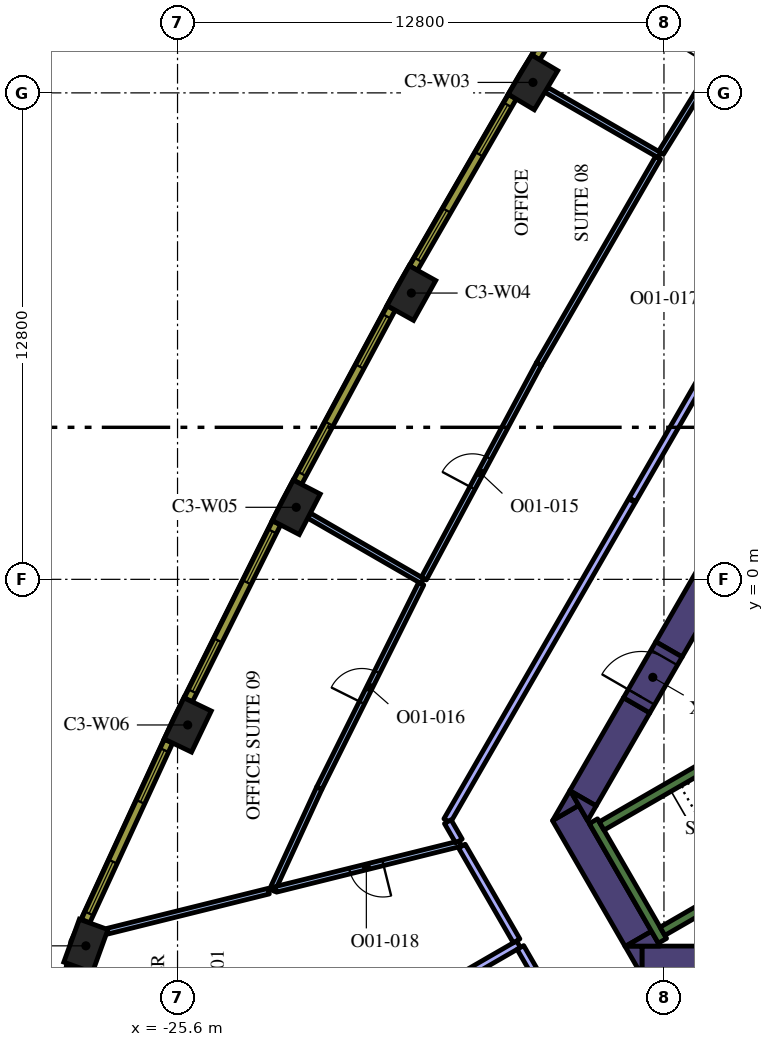
"""IFC4 building model, lengths in metres.
Left out: names, types, materials, properties, quantities, classifications, styles, units other than length and angle.
Written with IfcOpenShell. Run it as: python <this file> out.ifc"""

import sys

from ifc_helpers import new_model, si_unit, direction, frame, frame_2d, origin, origin_2d, place, context, subcontext, project, spatial, polyline, rectangle, outline, extrude, element, fill, save


model = new_model("IFC4")
c1 = context("Model", 3, precision=1e-05, world=origin(), true_north=direction((0.0, 1.0)))
c2 = subcontext(c1, "Body", "Model", "MODEL_VIEW")
j1 = project(units=[si_unit("LENGTHUNIT", "METRE"), si_unit("PLANEANGLEUNIT", "RADIAN")], contexts=[c1])
p1 = place(None, origin())
s1 = spatial("IfcSite", under=j1, at=p1, CompositionType="ELEMENT")
p2 = place(p1, origin())
s2 = spatial("IfcBuilding", under=s1, at=p2, CompositionType="ELEMENT")
p3 = place(p2, frame((0.0, 0.0, 145.8)))
s3 = spatial("IfcBuildingStorey", under=s2, at=p3, CompositionType="ELEMENT", Elevation=145.8)
for number, where, z_axis, x_axis in (
    (1, (-16.247, 13.075, 0.0), (0.0, 0.0, 1.0), (-0.513, -0.858, 0.0)),
    (2, (-19.447, 7.533, 0.0), (0.0, 0.0, 1.0), (-0.487, -0.874, 0.0)),
    (3, (-22.476, 1.896, 0.0), (0.0, 0.0, 1.0), (-0.46, -0.888, 0.0)),
    (4, (-25.332, -3.832, 0.0), (0.0, 0.0, 1.0), (-0.433, -0.902, 0.0)),
    (5, (-28.012, -9.644, 0.0), (0.0, 0.0, 1.0), (-0.341, -0.94, 0.0)),
):
    element("IfcColumn", number, at=place(p3, frame(where, z_axis=z_axis, x_axis=x_axis)), inside=s3, PredefinedType="COLUMN", context=c2, shape_type="SweptSolid", body=[
        extrude(rectangle(XDim=1.2, YDim=0.8, at=origin_2d()), origin(), (0.0, 0.0, 1.0), 4.2),
    ])
p4 = place(p3, frame((-13.378, -10.05, 0.0), z_axis=(0.0, 0.0, 1.0), x_axis=(1.0, 0.0, 0.0)))
e6 = element("IfcWall", 6, at=p4, inside=s3, PredefinedType="SOLIDWALL", context=c2, shape_type="SweptSolid", body=[
    extrude(rectangle(XDim=22.282, YDim=0.8, at=frame_2d((11.141, 0.0))), origin(), (0.0, 0.0, 1.0), 4.2),
])
p5 = place(p3, origin())
e7 = element("IfcWall", 7, at=p5, inside=s3, PredefinedType="SOLIDWALL", context=c2, shape_type="SweptSolid", body=[
    extrude(outline(polyline([(-13.828, -9.65), (-13.38, -9.65), (-13.38, -10.426), (-13.828, -9.65)])), origin(), (0.0, 0.0, 1.0), 4.2),
])
p6 = place(p3, frame((-15.387, -6.148, 0.0), z_axis=(0.0, 0.0, 1.0), x_axis=(0.499984020225, -0.866034629516, 0.0)))
e8 = element("IfcWall", 8, at=p6, inside=s3, PredefinedType="SOLIDWALL", context=c2, shape_type="SweptSolid", body=[
    extrude(rectangle(XDim=3.824, YDim=0.8, at=frame_2d((1.912, 0.0))), origin(), (0.0, 0.0, 1.0), 4.2),
])
e9 = element("IfcWall", 9, at=p5, inside=s3, PredefinedType="SOLIDWALL", context=c2, shape_type="SweptSolid", body=[
    extrude(outline(polyline([(-15.042, -5.947), (-15.729, -6.343), (-15.271, -5.55), (-15.042, -5.947)])), origin(), (0.0, 0.0, 1.0), 4.2),
])
e10 = element("IfcWall", 10, at=p5, inside=s3, PredefinedType="SOLIDWALL", context=c2, shape_type="SweptSolid", body=[
    extrude(outline(polyline([(-12.904, -9.65), (-13.8, -9.65), (-13.128, -9.262), (-12.904, -9.65)])), origin(), (0.0, 0.0, 1.0), 4.2),
])
p7 = place(p3, frame((-13.518, -3.314, 0.0), z_axis=(0.0, 0.0, 1.0), x_axis=(-0.499969377405, -0.866043083026, 0.0)))
e11 = element("IfcWall", 11, at=p7, inside=s3, PredefinedType="SOLIDWALL", context=c2, shape_type="SweptSolid", body=[
    extrude(rectangle(XDim=2.824, YDim=0.8, at=frame_2d((1.412, 0.0))), origin(), (0.0, 0.0, 1.0), 4.2),
])
e12 = element("IfcWall", 12, at=p5, inside=s3, PredefinedType="SOLIDWALL", context=c2, shape_type="SweptSolid", body=[
    extrude(outline(polyline([(-14.809, -6.35), (-15.257, -5.574), (-14.585, -5.962), (-14.809, -6.35)])), origin(), (0.0, 0.0, 1.0), 4.2),
])
p8 = place(p3, frame((-12.668, -1.842, 0.0), z_axis=(0.0, 0.0, 1.0), x_axis=(0.500003640647, 0.866023301845, 0.0)))
e13 = element("IfcWall", 13, at=p8, inside=s3, PredefinedType="SOLIDWALL", context=c2, shape_type="SweptSolid", body=[
    extrude(rectangle(XDim=15.858, YDim=0.8, at=frame_2d((7.929, 0.0))), origin(), (0.0, 0.0, 1.0), 4.2),
])
p9 = place(p3, frame((-12.84, -9.511, 0.0), z_axis=(0.0, 0.0, 1.0), x_axis=(-0.499997733992, 0.866026712061, 0.0)))
e14 = element("IfcWall", 14, at=p9, inside=s3, PredefinedType="SOLIDWALL", context=c2, shape_type="SweptSolid", body=[
    extrude(rectangle(XDim=3.634, YDim=0.25, at=frame_2d((1.817, 0.0))), origin(), (0.0, 0.0, 1.0), 4.2),
])
p10 = place(p3, frame((-14.44, -6.49, 0.0), z_axis=(0.0, 0.0, 1.0), x_axis=(0.866022966069, 0.500004222222, 0.0)))
e15 = element("IfcWall", 15, at=p10, inside=s3, PredefinedType="SOLIDWALL", context=c2, shape_type="SweptSolid", body=[
    extrude(rectangle(XDim=6.8, YDim=0.25, at=frame_2d((3.4, 0.0))), origin(), (0.0, 0.0, 1.0), 4.2),
])
p11 = place(p3, frame((-12.84, -9.261, 0.0), z_axis=(0.0, 0.0, 1.0), x_axis=(0.866016039709, 0.500016218704, 0.0)))
e16 = element("IfcWall", 16, at=p11, inside=s3, PredefinedType="SOLIDWALL", context=c2, shape_type="SweptSolid", body=[
    extrude(rectangle(XDim=7.05, YDim=0.25, at=frame_2d((3.525, 0.0))), origin(), (0.0, 0.0, 1.0), 4.2),
])
p12 = place(p3, frame((-13.518, -3.314, 0.0), z_axis=(0.0, 0.0, 1.0), x_axis=(0.500062241894, 0.865989465428, 0.0)))
e17 = element("IfcWall", 17, at=p12, inside=s3, PredefinedType="SOLIDWALL", context=c2, shape_type="SweptSolid", body=[
    extrude(rectangle(XDim=1.7, YDim=0.8, at=frame_2d((0.85, 0.0))), origin(), (0.0, 0.0, 1.0), 4.2),
])
p13 = place(p12, frame((0.25, 0.0, 0.0)))
e18 = element("IfcOpeningElement", 18, at=p13, cuts=e17, PredefinedType="OPENING", context=c2, shape_type="SweptSolid", body=[
    extrude(rectangle(XDim=1.2, YDim=2.1, at=frame_2d((0.6, 1.05))), frame((0.0, 0.41, 0.0), z_axis=(0.0, -1.0, 0.0), x_axis=(1.0, 0.0, 0.0)), (0.0, 0.0, 1.0), 0.82),
])
p14 = place(p3, frame((-25.421, -14.677, 0.0), z_axis=(0.0, 0.0, 1.0), x_axis=(0.866031435434, 0.499989552732, 0.0)))
e19 = element("IfcWall", 19, at=p14, inside=s3, PredefinedType="PARTITIONING", context=c2, shape_type="SweptSolid", body=[
    extrude(rectangle(XDim=10.154, YDim=0.2, at=frame_2d((5.077, 0.0))), origin(), (0.0, 0.0, 1.0), 3.15),
])
p15 = place(p3, frame((-16.578, -9.687, 0.0), z_axis=(0.0, 0.0, 1.0), x_axis=(0.499981686864, -0.86603597662, 0.0)))
e20 = element("IfcWall", 20, at=p15, inside=s3, PredefinedType="PARTITIONING", context=c2, shape_type="SweptSolid", body=[
    extrude(rectangle(XDim=3.506, YDim=0.2, at=frame_2d((1.753, 0.0))), origin(), (0.0, 0.0, 1.0), 3.15),
])
p16 = place(p3, frame((-12.917, 11.16, 0.0), z_axis=(0.0, 0.0, 1.0), x_axis=(-0.866039125629, 0.499976232315, 0.0)))
e21 = element("IfcWall", 21, at=p16, inside=s3, PredefinedType="PARTITIONING", context=c2, shape_type="SweptSolid", body=[
    extrude(rectangle(XDim=3.442, YDim=0.15, at=frame_2d((1.721, 0.0))), origin(), (0.0, 0.0, 1.0), 3.15),
])
p17 = place(p3, frame((-12.877, 11.224, 0.0), z_axis=(0.0, 0.0, 1.0), x_axis=(0.526202711334, 0.850359163286, 0.0)))
e22 = element("IfcWall", 22, at=p17, inside=s3, PredefinedType="PARTITIONING", context=c2, shape_type="SweptSolid", body=[
    extrude(rectangle(XDim=6.142, YDim=0.15, at=frame_2d((3.071, 0.0))), origin(), (0.0, 0.0, 1.0), 3.15),
])
p18 = place(p17, frame((2.642, 0.0, 0.0)))
e23 = element("IfcOpeningElement", 23, at=p18, cuts=e22, PredefinedType="OPENING", context=c2, shape_type="SweptSolid", body=[
    extrude(rectangle(XDim=0.9, YDim=2.1, at=frame_2d((0.45, 1.05))), frame((0.0, 0.085, 0.0), z_axis=(0.0, -1.0, 0.0), x_axis=(1.0, 0.0, 0.0)), (0.0, 0.0, 1.0), 0.17),
])
p19 = place(p3, frame((-19.154, -0.046, 0.0), z_axis=(0.0, 0.0, 1.0), x_axis=(-0.866051136095, 0.499955427682, 0.0)))
e24 = element("IfcWall", 24, at=p19, inside=s3, PredefinedType="PARTITIONING", context=c2, shape_type="SweptSolid", body=[
    extrude(rectangle(XDim=3.447, YDim=0.15, at=frame_2d((1.724, 0.0))), origin(), (0.0, 0.0, 1.0), 3.15),
])
p20 = place(p3, frame((-12.954, 11.095, 0.0), z_axis=(0.0, 0.0, 1.0), x_axis=(-0.500282785331, -0.865862076027, 0.0)))
e25 = element("IfcWall", 25, at=p20, inside=s3, PredefinedType="PARTITIONING", context=c2, shape_type="SweptSolid", body=[
    extrude(rectangle(XDim=6.273, YDim=0.15, at=frame_2d((3.136, 0.0))), origin(), (0.0, 0.0, 1.0), 3.15),
])
p21 = place(p3, frame((-19.118, 0.02, 0.0), z_axis=(0.0, 0.0, 1.0), x_axis=(0.47251230182, 0.88132407469, 0.0)))
e26 = element("IfcWall", 26, at=p21, inside=s3, PredefinedType="PARTITIONING", context=c2, shape_type="SweptSolid", body=[
    extrude(rectangle(XDim=6.404, YDim=0.15, at=frame_2d((3.202, 0.0))), origin(), (0.0, 0.0, 1.0), 3.15),
])
p22 = place(p21, frame((2.704, 0.0, 0.0)))
e27 = element("IfcOpeningElement", 27, at=p22, cuts=e26, PredefinedType="OPENING", context=c2, shape_type="SweptSolid", body=[
    extrude(rectangle(XDim=0.9, YDim=2.1, at=frame_2d((0.45, 1.05))), frame((0.0, 0.085, 0.0), z_axis=(0.0, -1.0, 0.0), x_axis=(1.0, 0.0, 0.0)), (0.0, 0.0, 1.0), 0.17),
])
p23 = place(p3, frame((-21.869, -5.493, 0.0), z_axis=(0.0, 0.0, 1.0), x_axis=(0.44618972677, 0.894938393257, 0.0)))
e28 = element("IfcWall", 28, at=p23, inside=s3, PredefinedType="PARTITIONING", context=c2, shape_type="SweptSolid", body=[
    extrude(rectangle(XDim=6.011, YDim=0.15, at=frame_2d((3.005, 0.0))), origin(), (0.0, 0.0, 1.0), 3.15),
])
p24 = place(p23, frame((2.511, 0.0, 0.0)))
e29 = element("IfcOpeningElement", 29, at=p24, cuts=e28, PredefinedType="OPENING", context=c2, shape_type="SweptSolid", body=[
    extrude(rectangle(XDim=0.9, YDim=2.1, at=frame_2d((0.45, 1.05))), frame((0.0, 0.085, 0.0), z_axis=(0.0, -1.0, 0.0), x_axis=(1.0, 0.0, 0.0)), (0.0, 0.0, 1.0), 0.17),
])
p25 = place(p3, frame((-21.869, -5.493, 0.0), z_axis=(0.0, 0.0, 1.0), x_axis=(-0.418791486232, -0.908082425256, 0.0)))
e30 = element("IfcWall", 30, at=p25, inside=s3, PredefinedType="PARTITIONING", context=c2, shape_type="SweptSolid", body=[
    extrude(rectangle(XDim=2.961, YDim=0.15, at=frame_2d((1.48, 0.0))), origin(), (0.0, 0.0, 1.0), 3.15),
])
p26 = place(p3, frame((-23.203, -8.205, 0.0), z_axis=(0.0, 0.0, 1.0), x_axis=(-0.970525493326, -0.240998478843, 0.0)))
e31 = element("IfcWall", 31, at=p26, inside=s3, PredefinedType="PARTITIONING", context=c2, shape_type="SweptSolid", body=[
    extrude(rectangle(XDim=4.373, YDim=0.15, at=frame_2d((2.187, 0.0))), origin(), (0.0, 0.0, 1.0), 3.15),
])
p27 = place(p3, frame((-18.156, -6.952, 0.0), z_axis=(0.0, 0.0, 1.0), x_axis=(-0.97052275783, -0.241009494697, 0.0)))
e32 = element("IfcWall", 32, at=p27, inside=s3, PredefinedType="PARTITIONING", context=c2, shape_type="SweptSolid", body=[
    extrude(rectangle(XDim=5.007, YDim=0.15, at=frame_2d((2.504, 0.0))), origin(), (0.0, 0.0, 1.0), 3.15),
])
p28 = place(p27, frame((2.1, 0.0, 0.0)))
e33 = element("IfcOpeningElement", 33, at=p28, cuts=e32, PredefinedType="OPENING", context=c2, shape_type="SweptSolid", body=[
    extrude(rectangle(XDim=0.9, YDim=2.1, at=frame_2d((0.45, 1.05))), frame((0.0, 0.085, 0.0), z_axis=(0.0, -1.0, 0.0), x_axis=(1.0, 0.0, 0.0)), (0.0, 0.0, 1.0), 0.17),
])
p29 = place(p3, frame((-8.628, 10.755, 0.0), z_axis=(0.0, 0.0, 1.0), x_axis=(-0.500004234368, -0.866022959057, 0.0)))
e34 = element("IfcWall", 34, at=p29, inside=s3, PredefinedType="PARTITIONING", context=c2, shape_type="SweptSolid", body=[
    extrude(rectangle(XDim=10.0, YDim=0.2, at=frame_2d((5.0, 0.0))), origin(), (0.0, 0.0, 1.0), 3.15),
])
p30 = place(p29, frame((4.5, 0.0, 0.0)))
e35 = element("IfcOpeningElement", 35, at=p30, cuts=e34, PredefinedType="OPENING", context=c2, shape_type="SweptSolid", body=[
    extrude(rectangle(XDim=1.0, YDim=2.1, at=frame_2d((0.5, 1.05))), frame((0.0, 0.11, 0.0), z_axis=(0.0, -1.0, 0.0), x_axis=(1.0, 0.0, 0.0)), (0.0, 0.0, 1.0), 0.22),
])
p31 = place(p3, frame((-13.643, 2.069, 0.0), z_axis=(0.0, 0.0, 1.0), x_axis=(-0.500012305324, -0.866018299186, 0.0)))
e36 = element("IfcWall", 36, at=p31, inside=s3, PredefinedType="PARTITIONING", context=c2, shape_type="SweptSolid", body=[
    extrude(rectangle(XDim=9.721, YDim=0.2, at=frame_2d((4.861, 0.0))), origin(), (0.0, 0.0, 1.0), 3.15),
])
p32 = place(p3, frame((-18.489, -6.376, 0.0), z_axis=(0.0, 0.0, 1.0), x_axis=(0.499986503906, -0.866033195618, 0.0)))
e37 = element("IfcWall", 37, at=p32, inside=s3, PredefinedType="PARTITIONING", context=c2, shape_type="SweptSolid", body=[
    extrude(rectangle(XDim=0.587, YDim=0.2, at=frame_2d((0.293, 0.0))), origin(), (0.0, 0.0, 1.0), 3.15),
])
p33 = place(p3, frame((-18.118, -7.02, 0.0), z_axis=(0.0, 0.0, 1.0), x_axis=(0.500023335103, -0.866011930837, 0.0)))
e38 = element("IfcWall", 38, at=p33, inside=s3, PredefinedType="PARTITIONING", context=c2, shape_type="SweptSolid", body=[
    extrude(rectangle(XDim=2.88, YDim=0.2, at=frame_2d((1.44, 0.0))), origin(), (0.0, 0.0, 1.0), 3.15),
])
p34 = place(p3, frame((-13.433, 18.156, 0.0), z_axis=(0.0, 0.0, 1.0), x_axis=(-0.526197926587, -0.850362124072, 0.0)))
e39 = element("IfcWall", 39, at=p34, inside=s3, PredefinedType="SOLIDWALL", context=c2, shape_type="SweptSolid", body=[
    extrude(rectangle(XDim=5.203, YDim=0.24, at=frame_2d((2.602, 0.0))), origin(), (0.0, 0.0, 1.0), 3.95),
])
p35 = place(p34, frame((0.248, 0.0, 0.9)))
e40 = element("IfcOpeningElement", 40, at=p35, cuts=e39, PredefinedType="OPENING", context=c2, shape_type="SweptSolid", body=[
    extrude(rectangle(XDim=1.5, YDim=2.55, at=frame_2d((0.75, 1.275))), frame((0.0, 0.13, 0.0), z_axis=(0.0, -1.0, 0.0), x_axis=(1.0, 0.0, 0.0)), (0.0, 0.0, 1.0), 0.26),
])
p36 = place(p34, frame((3.455, 0.0, 0.9)))
e41 = element("IfcOpeningElement", 41, at=p36, cuts=e39, PredefinedType="OPENING", context=c2, shape_type="SweptSolid", body=[
    extrude(rectangle(XDim=1.5, YDim=2.55, at=frame_2d((0.75, 1.275))), frame((0.0, 0.13, 0.0), z_axis=(0.0, -1.0, 0.0), x_axis=(1.0, 0.0, 0.0)), (0.0, 0.0, 1.0), 0.26),
])
p37 = place(p3, frame((-16.789, 12.697, 0.0), z_axis=(0.0, 0.0, 1.0), x_axis=(-0.500009456303, -0.866019944116, 0.0)))
e42 = element("IfcWall", 42, at=p37, inside=s3, PredefinedType="SOLIDWALL", context=c2, shape_type="SweptSolid", body=[
    extrude(rectangle(XDim=5.204, YDim=0.24, at=frame_2d((2.602, 0.0))), origin(), (0.0, 0.0, 1.0), 3.95),
])
p38 = place(p37, frame((0.248, 0.0, 0.9)))
e43 = element("IfcOpeningElement", 43, at=p38, cuts=e42, PredefinedType="OPENING", context=c2, shape_type="SweptSolid", body=[
    extrude(rectangle(XDim=1.5, YDim=2.55, at=frame_2d((0.75, 1.275))), frame((0.0, 0.13, 0.0), z_axis=(0.0, -1.0, 0.0), x_axis=(1.0, 0.0, 0.0)), (0.0, 0.0, 1.0), 0.26),
])
p39 = place(p37, frame((3.455, 0.0, 0.9)))
e44 = element("IfcOpeningElement", 44, at=p39, cuts=e42, PredefinedType="OPENING", context=c2, shape_type="SweptSolid", body=[
    extrude(rectangle(XDim=1.5, YDim=2.55, at=frame_2d((0.75, 1.275))), frame((0.0, 0.13, 0.0), z_axis=(0.0, -1.0, 0.0), x_axis=(1.0, 0.0, 0.0)), (0.0, 0.0, 1.0), 0.26),
])
p40 = place(p3, frame((-19.977, 7.139, 0.0), z_axis=(0.0, 0.0, 1.0), x_axis=(-0.473349833294, -0.880874528704, 0.0)))
e45 = element("IfcWall", 45, at=p40, inside=s3, PredefinedType="SOLIDWALL", context=c2, shape_type="SweptSolid", body=[
    extrude(rectangle(XDim=5.204, YDim=0.24, at=frame_2d((2.602, 0.0))), origin(), (0.0, 0.0, 1.0), 3.95),
])
p41 = place(p40, frame((0.248, 0.0, 0.9)))
e46 = element("IfcOpeningElement", 46, at=p41, cuts=e45, PredefinedType="OPENING", context=c2, shape_type="SweptSolid", body=[
    extrude(rectangle(XDim=1.5, YDim=2.55, at=frame_2d((0.75, 1.275))), frame((0.0, 0.13, 0.0), z_axis=(0.0, -1.0, 0.0), x_axis=(1.0, 0.0, 0.0)), (0.0, 0.0, 1.0), 0.26),
])
p42 = place(p40, frame((3.455, 0.0, 0.9)))
e47 = element("IfcOpeningElement", 47, at=p42, cuts=e45, PredefinedType="OPENING", context=c2, shape_type="SweptSolid", body=[
    extrude(rectangle(XDim=1.5, YDim=2.55, at=frame_2d((0.75, 1.275))), frame((0.0, 0.13, 0.0), z_axis=(0.0, -1.0, 0.0), x_axis=(1.0, 0.0, 0.0)), (0.0, 0.0, 1.0), 0.26),
])
p43 = place(p3, frame((-22.994, 1.485, 0.0), z_axis=(0.0, 0.0, 1.0), x_axis=(-0.446256171312, -0.8949052629, 0.0)))
e48 = element("IfcWall", 48, at=p43, inside=s3, PredefinedType="SOLIDWALL", context=c2, shape_type="SweptSolid", body=[
    extrude(rectangle(XDim=5.203, YDim=0.24, at=frame_2d((2.602, 0.0))), origin(), (0.0, 0.0, 1.0), 3.95),
])
p44 = place(p43, frame((0.248, 0.0, 0.9)))
e49 = element("IfcOpeningElement", 49, at=p44, cuts=e48, PredefinedType="OPENING", context=c2, shape_type="SweptSolid", body=[
    extrude(rectangle(XDim=1.5, YDim=2.55, at=frame_2d((0.75, 1.275))), frame((0.0, 0.13, 0.0), z_axis=(0.0, -1.0, 0.0), x_axis=(1.0, 0.0, 0.0)), (0.0, 0.0, 1.0), 0.26),
])
p45 = place(p43, frame((3.455, 0.0, 0.9)))
e50 = element("IfcOpeningElement", 50, at=p45, cuts=e48, PredefinedType="OPENING", context=c2, shape_type="SweptSolid", body=[
    extrude(rectangle(XDim=1.5, YDim=2.55, at=frame_2d((0.75, 1.275))), frame((0.0, 0.13, 0.0), z_axis=(0.0, -1.0, 0.0), x_axis=(1.0, 0.0, 0.0)), (0.0, 0.0, 1.0), 0.26),
])
p46 = place(p3, frame((-25.837, -4.258, 0.0), z_axis=(0.0, 0.0, 1.0), x_axis=(-0.418722559465, -0.908114209885, 0.0)))
e51 = element("IfcWall", 51, at=p46, inside=s3, PredefinedType="SOLIDWALL", context=c2, shape_type="SweptSolid", body=[
    extrude(rectangle(XDim=5.213, YDim=0.24, at=frame_2d((2.606, 0.0))), origin(), (0.0, 0.0, 1.0), 3.95),
])
p47 = place(p46, frame((0.261, 0.0, 0.9)))
e52 = element("IfcOpeningElement", 52, at=p47, cuts=e51, PredefinedType="OPENING", context=c2, shape_type="SweptSolid", body=[
    extrude(rectangle(XDim=1.5, YDim=2.55, at=frame_2d((0.75, 1.275))), frame((0.0, 0.13, 0.0), z_axis=(0.0, -1.0, 0.0), x_axis=(1.0, 0.0, 0.0)), (0.0, 0.0, 1.0), 0.26),
])
p48 = place(p46, frame((3.492, 0.0, 0.9)))
e53 = element("IfcOpeningElement", 53, at=p48, cuts=e51, PredefinedType="OPENING", context=c2, shape_type="SweptSolid", body=[
    extrude(rectangle(XDim=1.5, YDim=2.55, at=frame_2d((0.75, 1.275))), frame((0.0, 0.13, 0.0), z_axis=(0.0, -1.0, 0.0), x_axis=(1.0, 0.0, 0.0)), (0.0, 0.0, 1.0), 0.26),
])
p49 = place(p3, frame((-28.393, -10.167, 0.0), z_axis=(0.0, 0.0, 1.0), x_axis=(-0.180737189259, -0.983531427265, 0.0)))
e54 = element("IfcWall", 54, at=p49, inside=s3, PredefinedType="SOLIDWALL", context=c2, shape_type="SweptSolid", body=[
    extrude(rectangle(XDim=2.25, YDim=0.24, at=frame_2d((1.125, 0.0))), origin(), (0.0, 0.0, 1.0), 3.95),
])
p50 = place(p49, frame((0.625, 0.0, 0.9)))
e55 = element("IfcOpeningElement", 55, at=p50, cuts=e54, PredefinedType="OPENING", context=c2, shape_type="SweptSolid", body=[
    extrude(rectangle(XDim=1.0, YDim=2.55, at=frame_2d((0.5, 1.275))), frame((0.0, 0.13, 0.0), z_axis=(0.0, -1.0, 0.0), x_axis=(1.0, 0.0, 0.0)), (0.0, 0.0, 1.0), 0.26),
])
p51 = place(p13, origin())
e56 = element("IfcDoor", 56, at=p51, inside=s3, OperationType="SINGLE_SWING_LEFT", PredefinedType="DOOR", context=c2, shape_type="SweptSolid", body=[
    extrude(rectangle(XDim=1.2, YDim=2.1, at=frame_2d((0.6, 1.05))), frame((0.0, 0.025, 0.0), z_axis=(0.0, -1.0, 0.0), x_axis=(1.0, 0.0, 0.0)), (0.0, 0.0, 1.0), 0.05),
])
fill(e18, e56)
p52 = place(p22, origin())
e57 = element("IfcDoor", 57, at=p52, inside=s3, OperationType="SINGLE_SWING_LEFT", PredefinedType="DOOR", context=c2, shape_type="SweptSolid", body=[
    extrude(rectangle(XDim=0.9, YDim=2.1, at=frame_2d((0.45, 1.05))), frame((0.0, 0.025, 0.0), z_axis=(0.0, -1.0, 0.0), x_axis=(1.0, 0.0, 0.0)), (0.0, 0.0, 1.0), 0.05),
])
fill(e27, e57)
p53 = place(p24, origin())
e58 = element("IfcDoor", 58, at=p53, inside=s3, OperationType="SINGLE_SWING_LEFT", PredefinedType="DOOR", context=c2, shape_type="SweptSolid", body=[
    extrude(rectangle(XDim=0.9, YDim=2.1, at=frame_2d((0.45, 1.05))), frame((0.0, 0.025, 0.0), z_axis=(0.0, -1.0, 0.0), x_axis=(1.0, 0.0, 0.0)), (0.0, 0.0, 1.0), 0.05),
])
fill(e29, e58)
p54 = place(p28, origin())
e59 = element("IfcDoor", 59, at=p54, inside=s3, OperationType="SINGLE_SWING_RIGHT", PredefinedType="DOOR", context=c2, shape_type="SweptSolid", body=[
    extrude(rectangle(XDim=0.9, YDim=2.1, at=frame_2d((0.45, 1.05))), frame((0.0, 0.025, 0.0), z_axis=(0.0, -1.0, 0.0), x_axis=(1.0, 0.0, 0.0)), (0.0, 0.0, 1.0), 0.05),
])
fill(e33, e59)
p55 = place(p38, origin())
e60 = element("IfcWindow", 60, at=p55, inside=s3, PartitioningType="SINGLE_PANEL", PredefinedType="WINDOW", context=c2, shape_type="SweptSolid", body=[
    extrude(rectangle(XDim=1.5, YDim=2.55, at=frame_2d((0.75, 1.275))), frame((0.0, 0.04, 0.0), z_axis=(0.0, -1.0, 0.0), x_axis=(1.0, 0.0, 0.0)), (0.0, 0.0, 1.0), 0.06),
])
fill(e43, e60)
p56 = place(p39, origin())
e61 = element("IfcWindow", 61, at=p56, inside=s3, PartitioningType="SINGLE_PANEL", PredefinedType="WINDOW", context=c2, shape_type="SweptSolid", body=[
    extrude(rectangle(XDim=1.5, YDim=2.55, at=frame_2d((0.75, 1.275))), frame((0.0, 0.04, 0.0), z_axis=(0.0, -1.0, 0.0), x_axis=(1.0, 0.0, 0.0)), (0.0, 0.0, 1.0), 0.06),
])
fill(e44, e61)
p57 = place(p41, origin())
e62 = element("IfcWindow", 62, at=p57, inside=s3, PartitioningType="SINGLE_PANEL", PredefinedType="WINDOW", context=c2, shape_type="SweptSolid", body=[
    extrude(rectangle(XDim=1.5, YDim=2.55, at=frame_2d((0.75, 1.275))), frame((0.0, 0.04, 0.0), z_axis=(0.0, -1.0, 0.0), x_axis=(1.0, 0.0, 0.0)), (0.0, 0.0, 1.0), 0.06),
])
fill(e46, e62)
p58 = place(p42, origin())
e63 = element("IfcWindow", 63, at=p58, inside=s3, PartitioningType="SINGLE_PANEL", PredefinedType="WINDOW", context=c2, shape_type="SweptSolid", body=[
    extrude(rectangle(XDim=1.5, YDim=2.55, at=frame_2d((0.75, 1.275))), frame((0.0, 0.04, 0.0), z_axis=(0.0, -1.0, 0.0), x_axis=(1.0, 0.0, 0.0)), (0.0, 0.0, 1.0), 0.06),
])
fill(e47, e63)
p59 = place(p44, origin())
e64 = element("IfcWindow", 64, at=p59, inside=s3, PartitioningType="SINGLE_PANEL", PredefinedType="WINDOW", context=c2, shape_type="SweptSolid", body=[
    extrude(rectangle(XDim=1.5, YDim=2.55, at=frame_2d((0.75, 1.275))), frame((0.0, 0.04, 0.0), z_axis=(0.0, -1.0, 0.0), x_axis=(1.0, 0.0, 0.0)), (0.0, 0.0, 1.0), 0.06),
])
fill(e49, e64)
p60 = place(p45, origin())
e65 = element("IfcWindow", 65, at=p60, inside=s3, PartitioningType="SINGLE_PANEL", PredefinedType="WINDOW", context=c2, shape_type="SweptSolid", body=[
    extrude(rectangle(XDim=1.5, YDim=2.55, at=frame_2d((0.75, 1.275))), frame((0.0, 0.04, 0.0), z_axis=(0.0, -1.0, 0.0), x_axis=(1.0, 0.0, 0.0)), (0.0, 0.0, 1.0), 0.06),
])
fill(e50, e65)
p61 = place(p47, origin())
e66 = element("IfcWindow", 66, at=p61, inside=s3, PartitioningType="SINGLE_PANEL", PredefinedType="WINDOW", context=c2, shape_type="SweptSolid", body=[
    extrude(rectangle(XDim=1.5, YDim=2.55, at=frame_2d((0.75, 1.275))), frame((0.0, 0.04, 0.0), z_axis=(0.0, -1.0, 0.0), x_axis=(1.0, 0.0, 0.0)), (0.0, 0.0, 1.0), 0.06),
])
fill(e52, e66)
p62 = place(p48, origin())
e67 = element("IfcWindow", 67, at=p62, inside=s3, PartitioningType="SINGLE_PANEL", PredefinedType="WINDOW", context=c2, shape_type="SweptSolid", body=[
    extrude(rectangle(XDim=1.5, YDim=2.55, at=frame_2d((0.75, 1.275))), frame((0.0, 0.04, 0.0), z_axis=(0.0, -1.0, 0.0), x_axis=(1.0, 0.0, 0.0)), (0.0, 0.0, 1.0), 0.06),
])
fill(e53, e67)
save(model, sys.argv[1])
